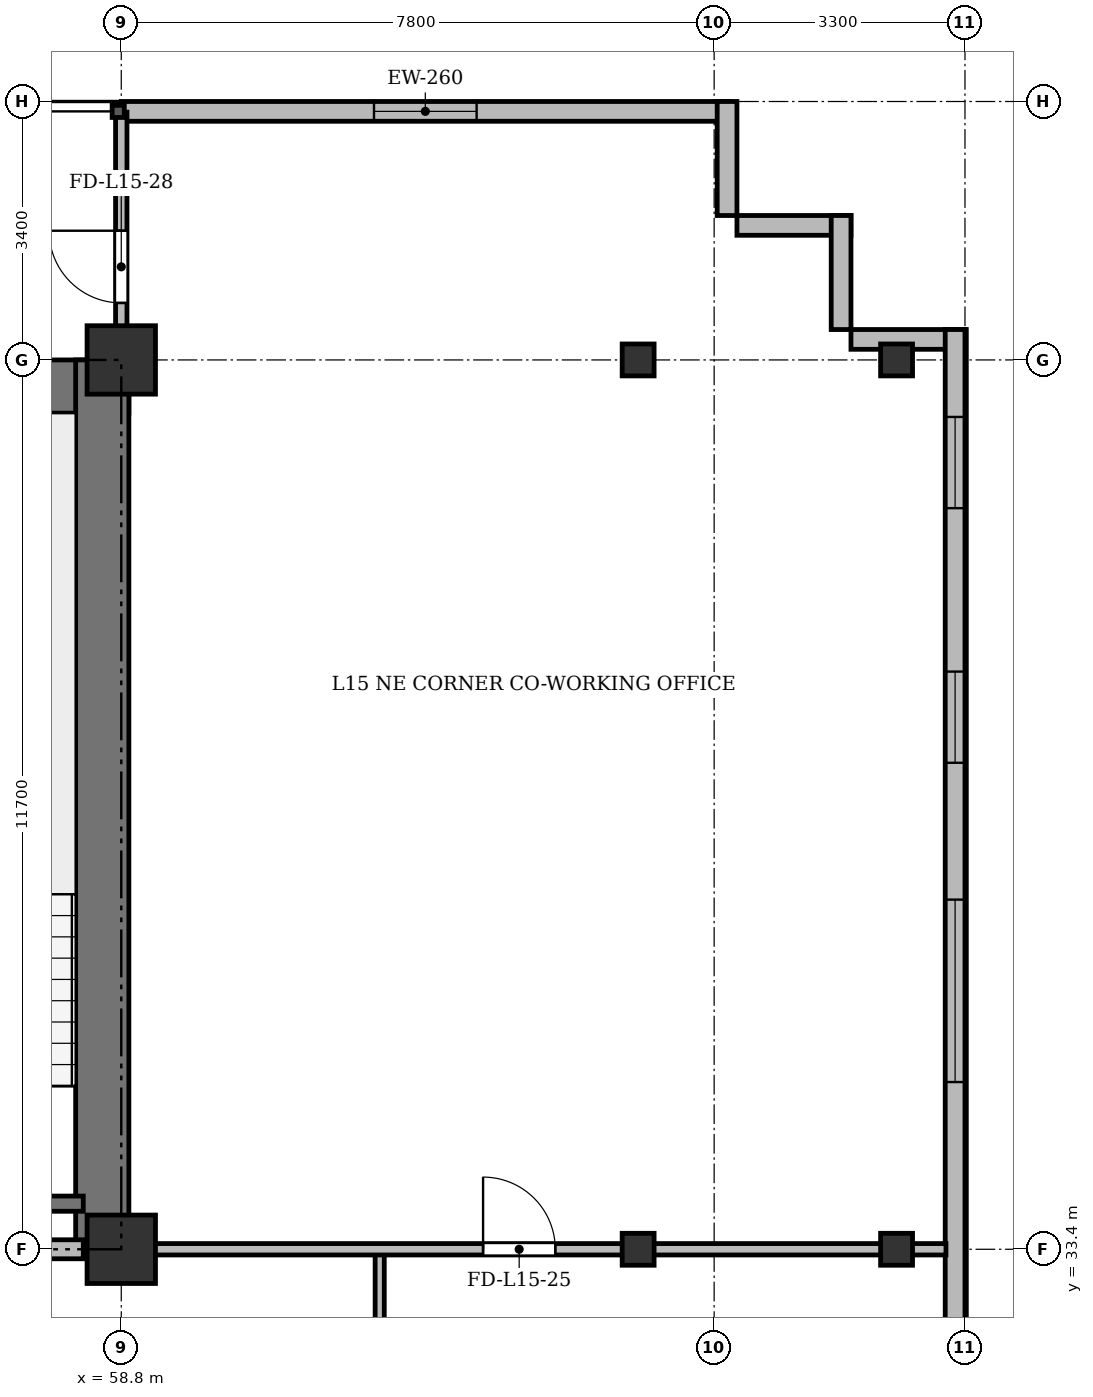
"""IFC4 building model, lengths in metres.
Left out: names, types, materials, properties, quantities, classifications, styles, units other than length and angle.
Written with IfcOpenShell. Run it as: python <this file> out.ifc"""

import sys

from ifc_helpers import new_model, si_unit, direction, frame, frame_2d, origin, origin_2d, place, context, subcontext, project, spatial, rectangle, i_section, extrude, source, transform, mapped, element, fill, save


model = new_model("IFC4")
c1 = context("Model", 3, precision=1e-05, world=origin(), true_north=direction((0.0, 1.0)))
c2 = subcontext(c1, "Body", "Model", "MODEL_VIEW")
j1 = project(units=[si_unit("LENGTHUNIT", "METRE"), si_unit("PLANEANGLEUNIT", "RADIAN")], contexts=[c1])
p1 = place(None, origin())
s1 = spatial("IfcSite", under=j1, at=p1, CompositionType="ELEMENT")
p2 = place(p1, origin())
s2 = spatial("IfcBuilding", under=s1, at=p2, CompositionType="ELEMENT")
p3 = place(p2, frame((0.0, 0.0, 59.5)))
s3 = spatial("IfcBuildingStorey", under=s2, at=p3, CompositionType="ELEMENT", Elevation=59.5)
m1 = source(origin(), c2, "Body", "SweptSolid", [
    extrude(rectangle(XDim=0.9, YDim=0.9, at=origin_2d()), origin(), (0.0, 0.0, 1.0), 3.6),
])
for number, where, z_axis, x_axis in (
    (1, (58.8, 33.4, 0.0), (0.0, 0.0, 1.0), (1.0, 0.0, 0.0)),
    (2, (58.8, 45.1, 0.0), (0.0, 0.0, 1.0), (1.0, 0.0, 0.0)),
):
    element("IfcColumn", number, at=place(p3, frame(where, z_axis=z_axis, x_axis=x_axis)), inside=s3, PredefinedType="COLUMN", context=c2, shape_type="MappedRepresentation", body=[
        mapped(m1, transform((0.0, 0.0, 0.0), x_axis=(1.0, 0.0, 0.0), y_axis=(0.0, 1.0, 0.0), z_axis=(0.0, 0.0, 1.0), scale=1.0)),
    ])
m2 = source(origin(), c2, "Body", "SweptSolid", [
    extrude(i_section(OverallWidth=0.42, OverallDepth=0.42, WebThickness=0.026, FlangeThickness=0.04, at=origin_2d()), origin(), (0.0, 0.0, 1.0), 3.6),
])
for number, where, z_axis, x_axis in (
    (3, (65.6, 33.4, 0.0), (0.0, 0.0, 1.0), (1.0, 0.0, 0.0)),
    (4, (65.6, 45.1, 0.0), (0.0, 0.0, 1.0), (1.0, 0.0, 0.0)),
    (5, (69.0, 33.4, 0.0), (0.0, 0.0, 1.0), (1.0, 0.0, 0.0)),
    (6, (69.0, 45.1, 0.0), (0.0, 0.0, 1.0), (1.0, 0.0, 0.0)),
):
    element("IfcColumn", number, at=place(p3, frame(where, z_axis=z_axis, x_axis=x_axis)), inside=s3, PredefinedType="COLUMN", context=c2, shape_type="MappedRepresentation", body=[
        mapped(m2, transform((0.0, 0.0, 0.0), x_axis=(1.0, 0.0, 0.0), y_axis=(0.0, 1.0, 0.0), z_axis=(0.0, 0.0, 1.0), scale=1.0)),
    ])
p4 = place(p3, frame((58.8, 48.37, 0.0), z_axis=(0.0, 0.0, 1.0), x_axis=(1.0, 0.0, 0.0)))
e7 = element("IfcWall", 7, at=p4, inside=s3, PredefinedType="SOLIDWALL", context=c2, shape_type="SweptSolid", body=[
    extrude(rectangle(XDim=8.0, YDim=0.26, at=frame_2d((4.0, 0.0))), origin(), (0.0, 0.0, 1.0), 3.34),
])
p5 = place(p4, frame((3.325, 0.0, 0.9)))
e8 = element("IfcOpeningElement", 8, at=p5, cuts=e7, PredefinedType="OPENING", context=c2, shape_type="SweptSolid", body=[
    extrude(rectangle(XDim=1.35, YDim=1.5, at=frame_2d((0.675, 0.75))), frame((0.0, 0.14, 0.0), z_axis=(0.0, -1.0, 0.0), x_axis=(1.0, 0.0, 0.0)), (0.0, 0.0, 1.0), 0.28),
])
for number, where, z_axis, x_axis in (
    (9, (66.77, 48.5, 0.0), (0.0, 0.0, 1.0), (0.0, -1.0, 0.0)),
    (10, (66.9, 46.87, 0.0), (0.0, 0.0, 1.0), (1.0, 0.0, 0.0)),
    (11, (68.27, 47.0, 0.0), (0.0, 0.0, 1.0), (0.0, -1.0, 0.0)),
):
    element("IfcWall", number, at=place(p3, frame(where, z_axis=z_axis, x_axis=x_axis)), inside=s3, PredefinedType="SOLIDWALL", context=c2, shape_type="SweptSolid", body=[
        extrude(rectangle(XDim=1.5, YDim=0.26, at=frame_2d((0.75, 0.0))), origin(), (0.0, 0.0, 1.0), 3.34),
    ])
p6 = place(p3, frame((68.4, 45.37, 0.0), z_axis=(0.0, 0.0, 1.0), x_axis=(1.0, 0.0, 0.0)))
e12 = element("IfcWall", 12, at=p6, inside=s3, PredefinedType="SOLIDWALL", context=c2, shape_type="SweptSolid", body=[
    extrude(rectangle(XDim=1.5, YDim=0.26, at=frame_2d((0.75, 0.0))), origin(), (0.0, 0.0, 1.0), 2.69),
])
p7 = place(p3, frame((69.77, 45.5, 0.0), z_axis=(0.0, 0.0, 1.0), x_axis=(0.0, -1.0, 0.0)))
e13 = element("IfcWall", 13, at=p7, inside=s3, PredefinedType="SOLIDWALL", context=c2, shape_type="SweptSolid", body=[
    extrude(rectangle(XDim=39.6, YDim=0.26, at=frame_2d((19.8, 0.0))), origin(), (0.0, 0.0, 1.0), 3.34),
])
p8 = place(p7, frame((36.95, 0.0, 0.92)))
e14 = element("IfcOpeningElement", 14, at=p8, cuts=e13, PredefinedType="OPENING", context=c2, shape_type="SweptSolid", body=[
    extrude(rectangle(XDim=1.2, YDim=1.65, at=frame_2d((0.6, 0.825))), frame((0.0, 0.14, 0.0), z_axis=(0.0, -1.0, 0.0), x_axis=(1.0, 0.0, 0.0)), (0.0, 0.0, 1.0), 0.28),
])
p9 = place(p7, frame((32.9, 0.0, 0.92)))
e15 = element("IfcOpeningElement", 15, at=p9, cuts=e13, PredefinedType="OPENING", context=c2, shape_type="SweptSolid", body=[
    extrude(rectangle(XDim=2.4, YDim=2.1, at=frame_2d((1.2, 1.05))), frame((0.0, 0.14, 0.0), z_axis=(0.0, -1.0, 0.0), x_axis=(1.0, 0.0, 0.0)), (0.0, 0.0, 1.0), 0.28),
])
p10 = place(p7, frame((28.7, 0.0, 0.92)))
e16 = element("IfcOpeningElement", 16, at=p10, cuts=e13, PredefinedType="OPENING", context=c2, shape_type="SweptSolid", body=[
    extrude(rectangle(XDim=2.4, YDim=2.1, at=frame_2d((1.2, 1.05))), frame((0.0, 0.14, 0.0), z_axis=(0.0, -1.0, 0.0), x_axis=(1.0, 0.0, 0.0)), (0.0, 0.0, 1.0), 0.28),
])
p11 = place(p7, frame((7.5, 0.0, 0.92)))
e17 = element("IfcOpeningElement", 17, at=p11, cuts=e13, PredefinedType="OPENING", context=c2, shape_type="SweptSolid", body=[
    extrude(rectangle(XDim=2.4, YDim=2.1, at=frame_2d((1.2, 1.05))), frame((0.0, 0.14, 0.0), z_axis=(0.0, -1.0, 0.0), x_axis=(1.0, 0.0, 0.0)), (0.0, 0.0, 1.0), 0.28),
])
p12 = place(p7, frame((4.5, 0.0, 0.92)))
e18 = element("IfcOpeningElement", 18, at=p12, cuts=e13, PredefinedType="OPENING", context=c2, shape_type="SweptSolid", body=[
    extrude(rectangle(XDim=1.2, YDim=1.65, at=frame_2d((0.6, 0.825))), frame((0.0, 0.14, 0.0), z_axis=(0.0, -1.0, 0.0), x_axis=(1.0, 0.0, 0.0)), (0.0, 0.0, 1.0), 0.28),
])
p13 = place(p7, frame((1.15, 0.0, 0.92)))
e19 = element("IfcOpeningElement", 19, at=p13, cuts=e13, PredefinedType="OPENING", context=c2, shape_type="SweptSolid", body=[
    extrude(rectangle(XDim=1.2, YDim=1.65, at=frame_2d((0.6, 0.825))), frame((0.0, 0.14, 0.0), z_axis=(0.0, -1.0, 0.0), x_axis=(1.0, 0.0, 0.0)), (0.0, 0.0, 1.0), 0.28),
])
p14 = place(p3, frame((15.5, 44.75, 0.0), z_axis=(0.0, 0.0, 1.0), x_axis=(1.0, 0.0, 0.0)))
e20 = element("IfcWall", 20, at=p14, inside=s3, PredefinedType="SHEAR", context=c2, shape_type="SweptSolid", body=[
    extrude(rectangle(XDim=43.4, YDim=0.7, at=frame_2d((21.7, 0.0))), origin(), (0.0, 0.0, 1.0), 3.34),
])
p15 = place(p3, frame((58.55, 33.4, 0.0), z_axis=(0.0, 0.0, 1.0), x_axis=(0.0, 1.0, 0.0)))
e21 = element("IfcWall", 21, at=p15, inside=s3, PredefinedType="SHEAR", context=c2, shape_type="SweptSolid", body=[
    extrude(rectangle(XDim=11.7, YDim=0.7, at=frame_2d((5.85, 0.0))), origin(), (0.0, 0.0, 1.0), 3.34),
])
p16 = place(p3, frame((54.9, 34.0, 0.0), z_axis=(0.0, 0.0, 1.0), x_axis=(1.0, 0.0, 0.0)))
e22 = element("IfcWall", 22, at=p16, inside=s3, PredefinedType="SHEAR", context=c2, shape_type="SweptSolid", body=[
    extrude(rectangle(XDim=3.4, YDim=0.2, at=frame_2d((1.7, 0.0))), origin(), (0.0, 0.0, 1.0), 3.34),
])
p17 = place(p3, frame((47.15, 33.4, 0.0), z_axis=(0.0, 0.0, 1.0), x_axis=(1.0, 0.0, 0.0)))
e23 = element("IfcWall", 23, at=p17, inside=s3, PredefinedType="PARTITIONING", context=c2, shape_type="SweptSolid", body=[
    extrude(rectangle(XDim=11.15, YDim=0.25, at=frame_2d((5.575, 0.0))), origin(), (0.0, 0.0, 1.0), 2.69),
])
p18 = place(p17, frame((0.7, 0.0, 0.0)))
e24 = element("IfcOpeningElement", 24, at=p18, cuts=e23, PredefinedType="OPENING", context=c2, shape_type="SweptSolid", body=[
    extrude(rectangle(XDim=0.95, YDim=2.15, at=frame_2d((0.475, 1.075))), frame((0.0, 0.135, 0.0), z_axis=(0.0, -1.0, 0.0), x_axis=(1.0, 0.0, 0.0)), (0.0, 0.0, 1.0), 0.27),
])
p19 = place(p17, frame((6.0, 0.0, 0.0)))
e25 = element("IfcOpeningElement", 25, at=p19, cuts=e23, PredefinedType="OPENING", context=c2, shape_type="SweptSolid", body=[
    extrude(rectangle(XDim=1.2, YDim=2.15, at=frame_2d((0.6, 1.075))), frame((0.0, 0.135, 0.0), z_axis=(0.0, -1.0, 0.0), x_axis=(1.0, 0.0, 0.0)), (0.0, 0.0, 1.0), 0.27),
])
p20 = place(p3, frame((62.2, 29.8, 0.0), z_axis=(0.0, 0.0, 1.0), x_axis=(0.0, 1.0, 0.0)))
e26 = element("IfcWall", 26, at=p20, inside=s3, PredefinedType="PARTITIONING", context=c2, shape_type="SweptSolid", body=[
    extrude(rectangle(XDim=3.6, YDim=0.12, at=frame_2d((1.8, 0.0))), origin(), (0.0, 0.0, 1.0), 2.69),
])
p21 = place(p3, frame((58.8, 33.4, 0.0), z_axis=(0.0, 0.0, 1.0), x_axis=(1.0, 0.0, 0.0)))
e27 = element("IfcWall", 27, at=p21, inside=s3, PredefinedType="PARTITIONING", context=c2, shape_type="SweptSolid", body=[
    extrude(rectangle(XDim=10.85, YDim=0.15, at=frame_2d((5.425, 0.0))), origin(), (0.0, 0.0, 1.0), 2.69),
])
p22 = place(p21, frame((4.76, 0.0, 0.0)))
e28 = element("IfcOpeningElement", 28, at=p22, cuts=e27, PredefinedType="OPENING", context=c2, shape_type="SweptSolid", body=[
    extrude(rectangle(XDim=0.95, YDim=2.15, at=frame_2d((0.475, 1.075))), frame((0.0, 0.085, 0.0), z_axis=(0.0, -1.0, 0.0), x_axis=(1.0, 0.0, 0.0)), (0.0, 0.0, 1.0), 0.17),
])
p23 = place(p3, frame((58.8, 44.75, 0.0), z_axis=(0.0, 0.0, 1.0), x_axis=(0.0, 1.0, 0.0)))
e29 = element("IfcWall", 29, at=p23, inside=s3, PredefinedType="PARTITIONING", context=c2, shape_type="SweptSolid", body=[
    extrude(rectangle(XDim=3.61, YDim=0.15, at=frame_2d((1.805, 0.0))), origin(), (0.0, 0.0, 1.0), 2.752),
])
p24 = place(p23, frame((1.1, 0.0, 0.0)))
e30 = element("IfcOpeningElement", 30, at=p24, cuts=e29, PredefinedType="OPENING", context=c2, shape_type="SweptSolid", body=[
    extrude(rectangle(XDim=0.95, YDim=2.15, at=frame_2d((0.475, 1.075))), frame((0.0, 0.085, 0.0), z_axis=(0.0, -1.0, 0.0), x_axis=(1.0, 0.0, 0.0)), (0.0, 0.0, 1.0), 0.17),
])
m3 = source(origin(), c2, "Body", "SweptSolid", [
    extrude(rectangle(XDim=1.35, YDim=1.5, at=frame_2d((0.675, 0.75))), frame((0.0, 0.03, 0.0), z_axis=(0.0, -1.0, 0.0), x_axis=(1.0, 0.0, 0.0)), (0.0, 0.0, 1.0), 0.06),
])
p25 = place(p5, origin())
e31 = element("IfcWindow", 31, at=p25, inside=s3, PartitioningType="SINGLE_PANEL", PredefinedType="WINDOW", context=c2, shape_type="MappedRepresentation", body=[
    mapped(m3, transform((0.0, 0.0, 0.0), x_axis=(1.0, 0.0, 0.0), y_axis=(0.0, 1.0, 0.0), z_axis=(0.0, 0.0, 1.0), scale=1.0)),
])
fill(e8, e31)
m4 = source(origin(), c2, "Body", "SweptSolid", [
    extrude(rectangle(XDim=2.4, YDim=2.1, at=frame_2d((1.2, 1.05))), frame((0.0, 0.03, 0.0), z_axis=(0.0, -1.0, 0.0), x_axis=(1.0, 0.0, 0.0)), (0.0, 0.0, 1.0), 0.06),
])
p26 = place(p11, origin())
e32 = element("IfcWindow", 32, at=p26, inside=s3, PartitioningType="SINGLE_PANEL", PredefinedType="WINDOW", context=c2, shape_type="MappedRepresentation", body=[
    mapped(m4, transform((0.0, 0.0, 0.0), x_axis=(1.0, 0.0, 0.0), y_axis=(0.0, 1.0, 0.0), z_axis=(0.0, 0.0, 1.0), scale=1.0)),
])
fill(e17, e32)
m5 = source(origin(), c2, "Body", "SweptSolid", [
    extrude(rectangle(XDim=1.2, YDim=1.65, at=frame_2d((0.6, 0.825))), frame((0.0, 0.03, 0.0), z_axis=(0.0, -1.0, 0.0), x_axis=(1.0, 0.0, 0.0)), (0.0, 0.0, 1.0), 0.06),
])
p27 = place(p12, origin())
e33 = element("IfcWindow", 33, at=p27, inside=s3, PartitioningType="SINGLE_PANEL", PredefinedType="WINDOW", context=c2, shape_type="MappedRepresentation", body=[
    mapped(m5, transform((0.0, 0.0, 0.0), x_axis=(1.0, 0.0, 0.0), y_axis=(0.0, 1.0, 0.0), z_axis=(0.0, 0.0, 1.0), scale=1.0)),
])
fill(e18, e33)
p28 = place(p13, origin())
e34 = element("IfcWindow", 34, at=p28, inside=s3, PartitioningType="SINGLE_PANEL", PredefinedType="WINDOW", context=c2, shape_type="MappedRepresentation", body=[
    mapped(m5, transform((0.0, 0.0, 0.0), x_axis=(1.0, 0.0, 0.0), y_axis=(0.0, 1.0, 0.0), z_axis=(0.0, 0.0, 1.0), scale=1.0)),
])
fill(e19, e34)
m6 = source(origin(), c2, "Body", "SweptSolid", [
    extrude(rectangle(XDim=0.95, YDim=2.15, at=frame_2d((0.475, 1.075))), frame((0.0, 0.025, 0.0), z_axis=(0.0, -1.0, 0.0), x_axis=(1.0, 0.0, 0.0)), (0.0, 0.0, 1.0), 0.05),
])
p29 = place(p22, origin())
e35 = element("IfcDoor", 35, at=p29, inside=s3, OperationType="SINGLE_SWING_LEFT", PredefinedType="DOOR", context=c2, shape_type="MappedRepresentation", body=[
    mapped(m6, transform((0.0, 0.0, 0.0), x_axis=(1.0, 0.0, 0.0), y_axis=(0.0, 1.0, 0.0), z_axis=(0.0, 0.0, 1.0), scale=1.0)),
])
fill(e28, e35)
p30 = place(p24, origin())
e36 = element("IfcDoor", 36, at=p30, inside=s3, OperationType="SINGLE_SWING_RIGHT", PredefinedType="DOOR", context=c2, shape_type="MappedRepresentation", body=[
    mapped(m6, transform((0.0, 0.0, 0.0), x_axis=(1.0, 0.0, 0.0), y_axis=(0.0, 1.0, 0.0), z_axis=(0.0, 0.0, 1.0), scale=1.0)),
])
fill(e30, e36)
save(model, sys.argv[1])
